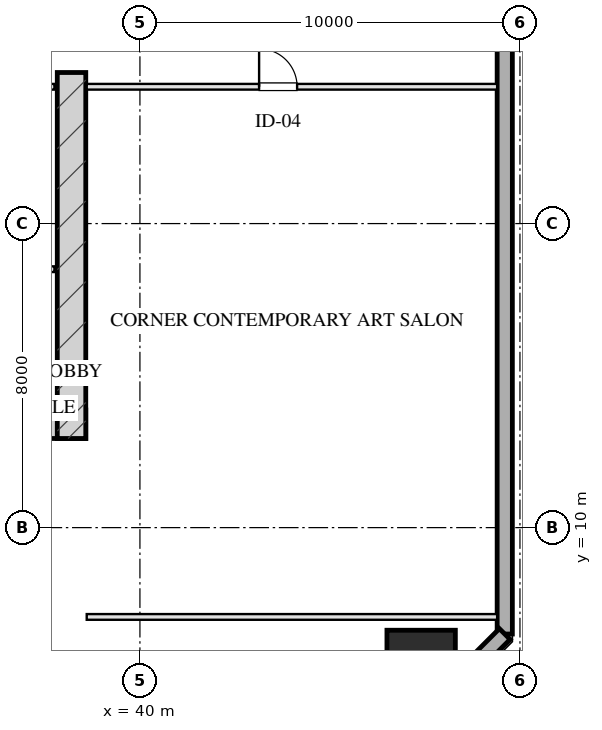
"""IFC4 building model, lengths in metres.
Left out: names, types, materials, properties, quantities, classifications, styles, units other than length and angle.
Written with IfcOpenShell. Run it as: python <this file> out.ifc"""

import sys

from ifc_helpers import new_model, si_unit, direction, frame, frame_2d, origin, origin_2d, place, context, subcontext, project, spatial, rectangle, hollow_rectangle, extrude, element, fill, save


model = new_model("IFC4")
c1 = context("Model", 3, precision=1e-05, world=origin(), true_north=direction((0.0, 1.0)))
c2 = subcontext(c1, "Body", "Model", "MODEL_VIEW")
j1 = project(units=[si_unit("LENGTHUNIT", "METRE"), si_unit("PLANEANGLEUNIT", "RADIAN")], contexts=[c1])
p1 = place(None, origin())
s1 = spatial("IfcSite", under=j1, at=p1, CompositionType="ELEMENT")
p2 = place(p1, origin())
s2 = spatial("IfcBuilding", under=s1, at=p2, CompositionType="ELEMENT")
p3 = place(p2, frame((0.0, 0.0, 60.95)))
s3 = spatial("IfcBuildingStorey", under=s2, at=p3, CompositionType="ELEMENT", Elevation=60.95)
p4 = place(p3, frame((21.425, 12.72, 0.0), z_axis=(0.0, 0.0, 1.0), x_axis=(1.0, 0.0, 0.0)))
e1 = element("IfcWall", 1, at=p4, inside=s3, PredefinedType="SHEAR", context=c2, shape_type="SweptSolid", body=[
    extrude(rectangle(XDim=17.15, YDim=0.75, at=frame_2d((8.575, 0.0))), origin(), (0.0, 0.0, 1.0), 3.45),
])
p5 = place(p3, frame((38.2, 21.975, 0.0), z_axis=(0.0, 0.0, 1.0), x_axis=(0.0, -1.0, 0.0)))
e2 = element("IfcWall", 2, at=p5, inside=s3, PredefinedType="SHEAR", context=c2, shape_type="SweptSolid", body=[
    extrude(rectangle(XDim=9.63, YDim=0.75, at=frame_2d((4.815, 0.0))), origin(), (0.0, 0.0, 1.0), 3.45),
])
p6 = place(p3, frame((47.4, 6.4, 0.0), z_axis=(0.0, 0.0, 1.0), x_axis=(1.0, 0.0, 0.0)))
e3 = element("IfcColumn", 3, at=p6, inside=s3, PredefinedType="COLUMN", context=c2, shape_type="SweptSolid", body=[
    extrude(hollow_rectangle(XDim=1.8, YDim=1.8, WallThickness=0.06, at=origin_2d()), origin(), (0.0, 0.0, 1.0), 3.451),
])
p7 = place(p3, frame((49.6, 60.8, 0.0), z_axis=(0.0, 0.0, 1.0), x_axis=(0.0, -1.0, 0.0)))
e4 = element("IfcWall", 4, at=p7, inside=s3, PredefinedType="SOLIDWALL", context=c2, shape_type="SweptSolid", body=[
    extrude(rectangle(XDim=53.6, YDim=0.4, at=frame_2d((26.8, 0.0))), origin(), (0.0, 0.0, 1.0), 2.61),
])
p8 = place(p7, frame((32.05, 0.0, 0.0)))
e5 = element("IfcOpeningElement", 5, at=p8, cuts=e4, PredefinedType="OPENING", context=c2, shape_type="SweptSolid", body=[
    extrude(rectangle(XDim=1.1, YDim=2.15, at=frame_2d((0.55, 1.075))), frame((0.0, 0.21, 0.0), z_axis=(0.0, -1.0, 0.0), x_axis=(1.0, 0.0, 0.0)), (0.0, 0.0, 1.0), 0.42),
])
p9 = place(p3, frame((49.6, 7.2, 0.0), z_axis=(0.0, 0.0, 1.0), x_axis=(-0.707106781187, -0.707106781187, 0.0)))
e6 = element("IfcWall", 6, at=p9, inside=s3, PredefinedType="SOLIDWALL", context=c2, shape_type="SweptSolid", body=[
    extrude(rectangle(XDim=4.243, YDim=0.4, at=frame_2d((2.121, 0.0))), origin(), (0.0, 0.0, 1.0), 2.61),
])
p10 = place(p3, frame((33.95, 21.6, 0.0), z_axis=(0.0, 0.0, 1.0), x_axis=(1.0, 0.0, 0.0)))
e7 = element("IfcWall", 7, at=p10, inside=s3, PredefinedType="PARTITIONING", context=c2, shape_type="SweptSolid", body=[
    extrude(rectangle(XDim=3.8, YDim=0.15, at=frame_2d((1.9, 0.0))), origin(), (0.0, 0.0, 1.0), 3.175),
])
p11 = place(p10, frame((0.22, 0.0, 0.0)))
e8 = element("IfcOpeningElement", 8, at=p11, cuts=e7, PredefinedType="OPENING", context=c2, shape_type="SweptSolid", body=[
    extrude(rectangle(XDim=0.95, YDim=2.05, at=frame_2d((0.475, 1.025))), frame((0.0, 0.085, 0.0), z_axis=(0.0, -1.0, 0.0), x_axis=(1.0, 0.0, 0.0)), (0.0, 0.0, 1.0), 0.17),
])
p12 = place(p3, frame((35.45, 16.8, 0.0), z_axis=(0.0, 0.0, 1.0), x_axis=(1.0, 0.0, 0.0)))
e9 = element("IfcWall", 9, at=p12, inside=s3, PredefinedType="PARTITIONING", context=c2, shape_type="SweptSolid", body=[
    extrude(rectangle(XDim=2.3, YDim=0.15, at=frame_2d((1.15, 0.0))), origin(), (0.0, 0.0, 1.0), 3.175),
])
p13 = place(p3, frame((38.6, 7.65, 0.0), z_axis=(0.0, 0.0, 1.0), x_axis=(1.0, 0.0, 0.0)))
e10 = element("IfcWall", 10, at=p13, inside=s3, PredefinedType="PARTITIONING", context=c2, shape_type="SweptSolid", body=[
    extrude(rectangle(XDim=10.8, YDim=0.15, at=frame_2d((5.4, 0.0))), origin(), (0.0, 0.0, 1.0), 3.175),
])
p14 = place(p3, frame((38.6, 21.6, 0.0), z_axis=(0.0, 0.0, 1.0), x_axis=(1.0, 0.0, 0.0)))
e11 = element("IfcWall", 11, at=p14, inside=s3, PredefinedType="PARTITIONING", context=c2, shape_type="SweptSolid", body=[
    extrude(rectangle(XDim=10.8, YDim=0.15, at=frame_2d((5.4, 0.0))), origin(), (0.0, 0.0, 1.0), 3.175),
])
p15 = place(p14, frame((4.536, 0.0, 0.0)))
e12 = element("IfcOpeningElement", 12, at=p15, cuts=e11, PredefinedType="OPENING", context=c2, shape_type="SweptSolid", body=[
    extrude(rectangle(XDim=1.0, YDim=2.05, at=frame_2d((0.5, 1.025))), frame((0.0, 0.085, 0.0), z_axis=(0.0, -1.0, 0.0), x_axis=(1.0, 0.0, 0.0)), (0.0, 0.0, 1.0), 0.17),
])
p16 = place(p15, origin())
e13 = element("IfcDoor", 13, at=p16, inside=s3, OperationType="SINGLE_SWING_LEFT", PredefinedType="DOOR", context=c2, shape_type="SweptSolid", body=[
    extrude(rectangle(XDim=1.0, YDim=2.05, at=frame_2d((0.5, 1.025))), frame((0.0, 0.025, 0.0), z_axis=(0.0, -1.0, 0.0), x_axis=(1.0, 0.0, 0.0)), (0.0, 0.0, 1.0), 0.05),
])
fill(e12, e13)
save(model, sys.argv[1])
